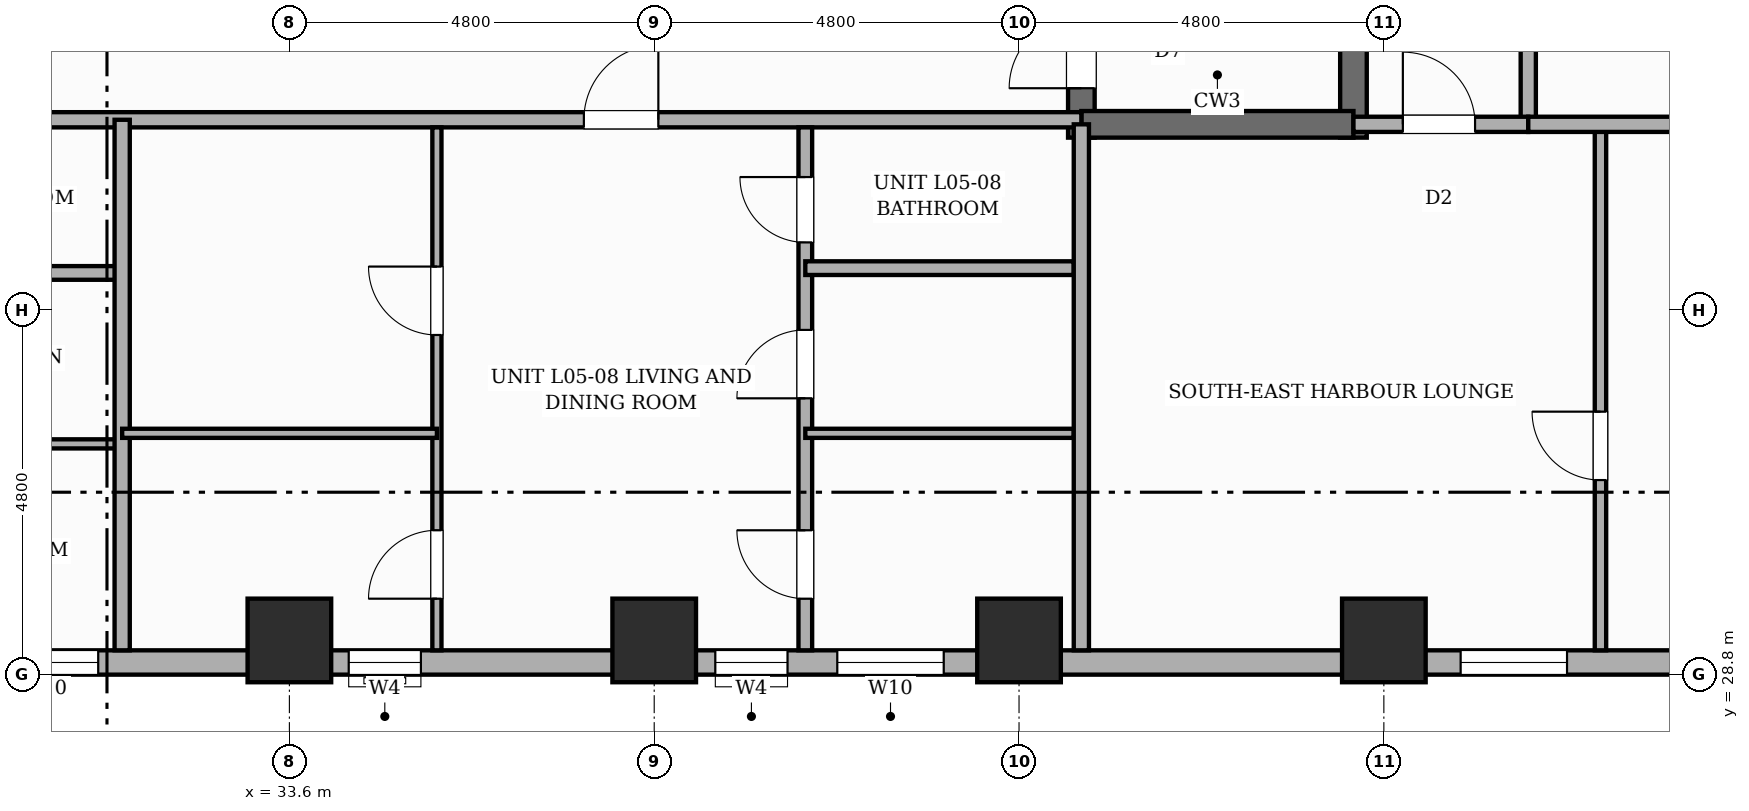
"""IFC4 building model, lengths in metres.
Left out: names, types, materials, properties, quantities, classifications, styles, units other than length and angle.
Written with IfcOpenShell. Run it as: python <this file> out.ifc"""

import sys

from ifc_helpers import new_model, si_unit, direction, frame, frame_2d, origin, origin_2d, place, context, subcontext, project, spatial, rectangle, extrude, element, fill, save


model = new_model("IFC4")
c1 = context("Model", 3, precision=1e-05, world=origin(), true_north=direction((0.0, 1.0)))
c2 = subcontext(c1, "Body", "Model", "MODEL_VIEW")
j1 = project(units=[si_unit("LENGTHUNIT", "METRE"), si_unit("PLANEANGLEUNIT", "RADIAN")], contexts=[c1])
p1 = place(None, origin())
s1 = spatial("IfcSite", under=j1, at=p1, CompositionType="ELEMENT")
p2 = place(p1, origin())
s2 = spatial("IfcBuilding", under=s1, at=p2, CompositionType="ELEMENT")
p3 = place(p2, frame((0.0, 0.0, 25.0)))
s3 = spatial("IfcBuildingStorey", under=s2, at=p3, CompositionType="ELEMENT", Elevation=25.0)
p4 = place(p3, frame((44.02, 35.865, 0.0), z_axis=(0.0, 0.0, 1.0), x_axis=(0.0, 1.0, 0.0)))
e1 = element("IfcWall", 1, at=p4, inside=s3, PredefinedType="SHEAR", context=c2, shape_type="SweptSolid", body=[
    extrude(rectangle(XDim=8.97, YDim=0.35, at=frame_2d((4.485, 0.0))), origin(), (0.0, 0.0, 1.0), 3.6),
])
p5 = place(p4, frame((0.65, 0.0, 0.0)))
e2 = element("IfcOpeningElement", 2, at=p5, cuts=e1, PredefinedType="OPENING", context=c2, shape_type="SweptSolid", body=[
    extrude(rectangle(XDim=0.95, YDim=2.1, at=frame_2d((0.475, 1.05))), frame((0.0, 0.185, 0.0), z_axis=(0.0, -1.0, 0.0), x_axis=(1.0, 0.0, 0.0)), (0.0, 0.0, 1.0), 0.37),
])
p6 = place(p3, frame((47.6, 35.865, 0.0), z_axis=(0.0, 0.0, 1.0), x_axis=(0.0, 1.0, 0.0)))
e3 = element("IfcWall", 3, at=p6, inside=s3, PredefinedType="SHEAR", context=c2, shape_type="SweptSolid", body=[
    extrude(rectangle(XDim=8.97, YDim=0.35, at=frame_2d((4.485, 0.0))), origin(), (0.0, 0.0, 1.0), 3.6),
])
p7 = place(p3, frame((44.02, 36.04, 0.0), z_axis=(0.0, 0.0, 1.0), x_axis=(1.0, 0.0, 0.0)))
e4 = element("IfcWall", 4, at=p7, inside=s3, PredefinedType="SHEAR", context=c2, shape_type="SweptSolid", body=[
    extrude(rectangle(XDim=3.58, YDim=0.35, at=frame_2d((1.79, 0.0))), origin(), (0.0, 0.0, 1.0), 3.6),
])
for number, where, z_axis, x_axis in (
    (5, (33.6, 29.25, 0.0), (0.0, 0.0, 1.0), (1.0, 0.0, 0.0)),
    (6, (38.4, 29.25, 0.0), (0.0, 0.0, 1.0), (1.0, 0.0, 0.0)),
    (7, (43.2, 29.25, 0.0), (0.0, 0.0, 1.0), (1.0, 0.0, 0.0)),
    (8, (48.0, 29.25, 0.0), (0.0, 0.0, 1.0), (1.0, 0.0, 0.0)),
):
    element("IfcColumn", number, at=place(p3, frame(where, z_axis=z_axis, x_axis=x_axis)), inside=s3, PredefinedType="COLUMN", context=c2, shape_type="SweptSolid", body=[
        extrude(rectangle(XDim=1.1, YDim=1.1, at=origin_2d()), origin(), (0.0, 0.0, 1.0), 3.6),
    ])
p8 = place(p3, frame((55.2, 28.96, 0.0), z_axis=(0.0, 0.0, 1.0), x_axis=(-1.0, 0.0, 0.0)))
e9 = element("IfcWall", 9, at=p8, inside=s3, PredefinedType="STANDARD", context=c2, shape_type="SweptSolid", body=[
    extrude(rectangle(XDim=28.8, YDim=0.32, at=frame_2d((14.4, 0.0))), origin(), (0.0, 0.0, 1.0), 2.53),
])
p9 = place(p8, frame((24.115, 0.0, 0.65)))
e10 = element("IfcOpeningElement", 10, at=p9, cuts=e9, PredefinedType="OPENING", context=c2, shape_type="SweptSolid", body=[
    extrude(rectangle(XDim=1.4, YDim=1.1, at=frame_2d((0.7, 0.55))), frame((0.0, 0.17, 0.0), z_axis=(0.0, -1.0, 0.0), x_axis=(1.0, 0.0, 0.0)), (0.0, 0.0, 1.0), 0.34),
])
p10 = place(p8, frame((12.991, 0.0, 0.65)))
e11 = element("IfcOpeningElement", 11, at=p10, cuts=e9, PredefinedType="OPENING", context=c2, shape_type="SweptSolid", body=[
    extrude(rectangle(XDim=1.4, YDim=1.1, at=frame_2d((0.7, 0.55))), frame((0.0, 0.17, 0.0), z_axis=(0.0, -1.0, 0.0), x_axis=(1.0, 0.0, 0.0)), (0.0, 0.0, 1.0), 0.34),
])
p11 = place(p8, frame((19.869, 0.0, 0.45)))
e12 = element("IfcOpeningElement", 12, at=p11, cuts=e9, PredefinedType="OPENING", context=c2, shape_type="SweptSolid", body=[
    extrude(rectangle(XDim=0.95, YDim=1.8, at=frame_2d((0.475, 0.9))), frame((0.0, 0.17, 0.0), z_axis=(0.0, -1.0, 0.0), x_axis=(1.0, 0.0, 0.0)), (0.0, 0.0, 1.0), 0.34),
])
p12 = place(p8, frame((4.79, 0.0, 0.65)))
e13 = element("IfcOpeningElement", 13, at=p12, cuts=e9, PredefinedType="OPENING", context=c2, shape_type="SweptSolid", body=[
    extrude(rectangle(XDim=1.4, YDim=1.1, at=frame_2d((0.7, 0.55))), frame((0.0, 0.17, 0.0), z_axis=(0.0, -1.0, 0.0), x_axis=(1.0, 0.0, 0.0)), (0.0, 0.0, 1.0), 0.34),
])
p13 = place(p8, frame((0.47, 0.0, 0.65)))
e14 = element("IfcOpeningElement", 14, at=p13, cuts=e9, PredefinedType="OPENING", context=c2, shape_type="SweptSolid", body=[
    extrude(rectangle(XDim=1.4, YDim=1.1, at=frame_2d((0.7, 0.55))), frame((0.0, 0.17, 0.0), z_axis=(0.0, -1.0, 0.0), x_axis=(1.0, 0.0, 0.0)), (0.0, 0.0, 1.0), 0.34),
])
p14 = place(p8, frame((15.046, 0.0, 0.45)))
e15 = element("IfcOpeningElement", 15, at=p14, cuts=e9, PredefinedType="OPENING", context=c2, shape_type="SweptSolid", body=[
    extrude(rectangle(XDim=0.95, YDim=1.8, at=frame_2d((0.475, 0.9))), frame((0.0, 0.17, 0.0), z_axis=(0.0, -1.0, 0.0), x_axis=(1.0, 0.0, 0.0)), (0.0, 0.0, 1.0), 0.34),
])
p15 = place(p3, frame((22.75, 36.1, 0.0), z_axis=(0.0, 0.0, 1.0), x_axis=(1.0, 0.0, 0.0)))
e16 = element("IfcWall", 16, at=p15, inside=s3, PredefinedType="PARTITIONING", context=c2, shape_type="SweptSolid", body=[
    extrude(rectangle(XDim=21.27, YDim=0.2, at=frame_2d((10.635, 0.0))), origin(), (0.0, 0.0, 1.0), 3.35),
])
p16 = place(p15, frame((1.628, 0.0, 0.0)))
e17 = element("IfcOpeningElement", 17, at=p16, cuts=e16, PredefinedType="OPENING", context=c2, shape_type="SweptSolid", body=[
    extrude(rectangle(XDim=0.98, YDim=2.18, at=frame_2d((0.49, 1.09))), frame((0.0, 0.11, 0.0), z_axis=(0.0, -1.0, 0.0), x_axis=(1.0, 0.0, 0.0)), (0.0, 0.0, 1.0), 0.22),
])
p17 = place(p15, frame((14.725, 0.0, 0.0)))
e18 = element("IfcOpeningElement", 18, at=p17, cuts=e16, PredefinedType="OPENING", context=c2, shape_type="SweptSolid", body=[
    extrude(rectangle(XDim=0.98, YDim=2.18, at=frame_2d((0.49, 1.09))), frame((0.0, 0.11, 0.0), z_axis=(0.0, -1.0, 0.0), x_axis=(1.0, 0.0, 0.0)), (0.0, 0.0, 1.0), 0.22),
])
p18 = place(p3, frame((26.807, 31.836, 0.0), z_axis=(0.0, 0.0, 1.0), x_axis=(1.0, 0.0, 0.0)))
e19 = element("IfcWall", 19, at=p18, inside=s3, PredefinedType="PARTITIONING", context=c2, shape_type="SweptSolid", body=[
    extrude(rectangle(XDim=4.593, YDim=0.12, at=frame_2d((2.296, 0.0))), origin(), (0.0, 0.0, 1.0), 3.35),
])
p19 = place(p3, frame((26.807, 34.085, 0.0), z_axis=(0.0, 0.0, 1.0), x_axis=(1.0, 0.0, 0.0)))
e20 = element("IfcWall", 20, at=p19, inside=s3, PredefinedType="PLUMBINGWALL", context=c2, shape_type="SweptSolid", body=[
    extrude(rectangle(XDim=4.593, YDim=0.18, at=frame_2d((2.296, 0.0))), origin(), (0.0, 0.0, 1.0), 3.35),
])
p20 = place(p3, frame((31.4, 29.12, 0.0), z_axis=(0.0, 0.0, 1.0), x_axis=(0.0, 1.0, 0.0)))
e21 = element("IfcWall", 21, at=p20, inside=s3, PredefinedType="SOLIDWALL", context=c2, shape_type="SweptSolid", body=[
    extrude(rectangle(XDim=6.98, YDim=0.2, at=frame_2d((3.49, 0.0))), origin(), (0.0, 0.0, 1.0), 3.35),
])
p21 = place(p3, frame((40.388, 29.12, 0.0), z_axis=(0.0, 0.0, 1.0), x_axis=(0.0, 1.0, 0.0)))
e22 = element("IfcWall", 22, at=p21, inside=s3, PredefinedType="PLUMBINGWALL", context=c2, shape_type="SweptSolid", body=[
    extrude(rectangle(XDim=6.88, YDim=0.18, at=frame_2d((3.44, 0.0))), origin(), (0.0, 0.0, 1.0), 3.35),
])
p22 = place(p21, frame((0.679, 0.0, 0.0)))
e23 = element("IfcOpeningElement", 23, at=p22, cuts=e22, PredefinedType="OPENING", context=c2, shape_type="SweptSolid", body=[
    extrude(rectangle(XDim=0.9, YDim=2.15, at=frame_2d((0.45, 1.075))), frame((0.0, 0.1, 0.0), z_axis=(0.0, -1.0, 0.0), x_axis=(1.0, 0.0, 0.0)), (0.0, 0.0, 1.0), 0.2),
])
p23 = place(p21, frame((3.315, 0.0, 0.0)))
e24 = element("IfcOpeningElement", 24, at=p23, cuts=e22, PredefinedType="OPENING", context=c2, shape_type="SweptSolid", body=[
    extrude(rectangle(XDim=0.9, YDim=2.15, at=frame_2d((0.45, 1.075))), frame((0.0, 0.1, 0.0), z_axis=(0.0, -1.0, 0.0), x_axis=(1.0, 0.0, 0.0)), (0.0, 0.0, 1.0), 0.2),
])
p24 = place(p21, frame((5.366, 0.0, 0.0)))
e25 = element("IfcOpeningElement", 25, at=p24, cuts=e22, PredefinedType="OPENING", context=c2, shape_type="SweptSolid", body=[
    extrude(rectangle(XDim=0.86, YDim=2.1, at=frame_2d((0.43, 1.05))), frame((0.0, 0.1, 0.0), z_axis=(0.0, -1.0, 0.0), x_axis=(1.0, 0.0, 0.0)), (0.0, 0.0, 1.0), 0.2),
])
p25 = place(p3, frame((35.541, 29.12, 0.0), z_axis=(0.0, 0.0, 1.0), x_axis=(0.0, 1.0, 0.0)))
e26 = element("IfcWall", 26, at=p25, inside=s3, PredefinedType="PARTITIONING", context=c2, shape_type="SweptSolid", body=[
    extrude(rectangle(XDim=6.88, YDim=0.12, at=frame_2d((3.44, 0.0))), origin(), (0.0, 0.0, 1.0), 3.35),
])
p26 = place(p25, frame((0.679, 0.0, 0.0)))
e27 = element("IfcOpeningElement", 27, at=p26, cuts=e26, PredefinedType="OPENING", context=c2, shape_type="SweptSolid", body=[
    extrude(rectangle(XDim=0.9, YDim=2.15, at=frame_2d((0.45, 1.075))), frame((0.0, 0.07, 0.0), z_axis=(0.0, -1.0, 0.0), x_axis=(1.0, 0.0, 0.0)), (0.0, 0.0, 1.0), 0.14),
])
p27 = place(p25, frame((4.149, 0.0, 0.0)))
e28 = element("IfcOpeningElement", 28, at=p27, cuts=e26, PredefinedType="OPENING", context=c2, shape_type="SweptSolid", body=[
    extrude(rectangle(XDim=0.9, YDim=2.15, at=frame_2d((0.45, 1.075))), frame((0.0, 0.07, 0.0), z_axis=(0.0, -1.0, 0.0), x_axis=(1.0, 0.0, 0.0)), (0.0, 0.0, 1.0), 0.14),
])
p28 = place(p3, frame((31.4, 31.975, 0.0), z_axis=(0.0, 0.0, 1.0), x_axis=(1.0, 0.0, 0.0)))
e29 = element("IfcWall", 29, at=p28, inside=s3, PredefinedType="PARTITIONING", context=c2, shape_type="SweptSolid", body=[
    extrude(rectangle(XDim=4.141, YDim=0.12, at=frame_2d((2.071, 0.0))), origin(), (0.0, 0.0, 1.0), 3.35),
])
p29 = place(p3, frame((40.388, 31.975, 0.0), z_axis=(0.0, 0.0, 1.0), x_axis=(1.0, 0.0, 0.0)))
e30 = element("IfcWall", 30, at=p29, inside=s3, PredefinedType="PARTITIONING", context=c2, shape_type="SweptSolid", body=[
    extrude(rectangle(XDim=3.532, YDim=0.12, at=frame_2d((1.766, 0.0))), origin(), (0.0, 0.0, 1.0), 3.35),
])
p30 = place(p3, frame((40.388, 34.148, 0.0), z_axis=(0.0, 0.0, 1.0), x_axis=(1.0, 0.0, 0.0)))
e31 = element("IfcWall", 31, at=p30, inside=s3, PredefinedType="PLUMBINGWALL", context=c2, shape_type="SweptSolid", body=[
    extrude(rectangle(XDim=3.532, YDim=0.18, at=frame_2d((1.766, 0.0))), origin(), (0.0, 0.0, 1.0), 3.35),
])
p31 = place(p3, frame((49.9, 36.04, 0.0), z_axis=(0.0, 0.0, 1.0), x_axis=(0.0, 1.0, 0.0)))
e32 = element("IfcWall", 32, at=p31, inside=s3, PredefinedType="PARTITIONING", context=c2, shape_type="SweptSolid", body=[
    extrude(rectangle(XDim=11.64, YDim=0.2, at=frame_2d((5.82, 0.0))), origin(), (0.0, 0.0, 1.0), 3.35),
])
p32 = place(p31, frame((6.251, 0.0, 0.0)))
e33 = element("IfcOpeningElement", 33, at=p32, cuts=e32, PredefinedType="OPENING", context=c2, shape_type="SweptSolid", body=[
    extrude(rectangle(XDim=0.98, YDim=2.18, at=frame_2d((0.49, 1.09))), frame((0.0, 0.11, 0.0), z_axis=(0.0, -1.0, 0.0), x_axis=(1.0, 0.0, 0.0)), (0.0, 0.0, 1.0), 0.22),
])
p33 = place(p3, frame((47.6, 36.04, 0.0), z_axis=(0.0, 0.0, 1.0), x_axis=(1.0, 0.0, 0.0)))
e34 = element("IfcWall", 34, at=p33, inside=s3, PredefinedType="PARTITIONING", context=c2, shape_type="SweptSolid", body=[
    extrude(rectangle(XDim=2.3, YDim=0.2, at=frame_2d((1.15, 0.0))), origin(), (0.0, 0.0, 1.0), 3.35),
])
p34 = place(p33, frame((0.65, 0.0, 0.0)))
e35 = element("IfcOpeningElement", 35, at=p34, cuts=e34, PredefinedType="OPENING", context=c2, shape_type="SweptSolid", body=[
    extrude(rectangle(XDim=0.95, YDim=2.15, at=frame_2d((0.475, 1.075))), frame((0.0, 0.11, 0.0), z_axis=(0.0, -1.0, 0.0), x_axis=(1.0, 0.0, 0.0)), (0.0, 0.0, 1.0), 0.22),
])
p35 = place(p3, frame((44.02, 29.12, 0.0), z_axis=(0.0, 0.0, 1.0), x_axis=(0.0, 1.0, 0.0)))
e36 = element("IfcWall", 36, at=p35, inside=s3, PredefinedType="SOLIDWALL", context=c2, shape_type="SweptSolid", body=[
    extrude(rectangle(XDim=6.92, YDim=0.2, at=frame_2d((3.46, 0.0))), origin(), (0.0, 0.0, 1.0), 3.35),
])
p36 = place(p3, frame((50.85, 29.12, 0.0), z_axis=(0.0, 0.0, 1.0), x_axis=(0.0, 1.0, 0.0)))
e37 = element("IfcWall", 37, at=p36, inside=s3, PredefinedType="PARTITIONING", context=c2, shape_type="SweptSolid", body=[
    extrude(rectangle(XDim=6.92, YDim=0.15, at=frame_2d((3.46, 0.0))), origin(), (0.0, 0.0, 1.0), 3.35),
])
p37 = place(p36, frame((2.24, 0.0, 0.0)))
e38 = element("IfcOpeningElement", 38, at=p37, cuts=e37, PredefinedType="OPENING", context=c2, shape_type="SweptSolid", body=[
    extrude(rectangle(XDim=0.9, YDim=2.15, at=frame_2d((0.45, 1.075))), frame((0.0, 0.085, 0.0), z_axis=(0.0, -1.0, 0.0), x_axis=(1.0, 0.0, 0.0)), (0.0, 0.0, 1.0), 0.17),
])
p38 = place(p3, frame((49.9, 36.04, 0.0), z_axis=(0.0, 0.0, 1.0), x_axis=(1.0, 0.0, 0.0)))
e39 = element("IfcWall", 39, at=p38, inside=s3, PredefinedType="SOLIDWALL", context=c2, shape_type="SweptSolid", body=[
    extrude(rectangle(XDim=7.38, YDim=0.2, at=frame_2d((3.69, 0.0))), origin(), (0.0, 0.0, 1.0), 3.35),
])
p39 = place(p9, origin())
e40 = element("IfcWindow", 40, at=p39, inside=s3, PartitioningType="SINGLE_PANEL", PredefinedType="WINDOW", context=c2, shape_type="SweptSolid", body=[
    extrude(rectangle(XDim=1.4, YDim=1.1, at=frame_2d((0.7, 0.55))), frame((0.0, 0.03, 0.0), z_axis=(0.0, -1.0, 0.0), x_axis=(1.0, 0.0, 0.0)), (0.0, 0.0, 1.0), 0.06),
])
fill(e10, e40)
p40 = place(p10, origin())
e41 = element("IfcWindow", 41, at=p40, inside=s3, PartitioningType="SINGLE_PANEL", PredefinedType="WINDOW", context=c2, shape_type="SweptSolid", body=[
    extrude(rectangle(XDim=1.4, YDim=1.1, at=frame_2d((0.7, 0.55))), frame((0.0, 0.03, 0.0), z_axis=(0.0, -1.0, 0.0), x_axis=(1.0, 0.0, 0.0)), (0.0, 0.0, 1.0), 0.06),
])
fill(e11, e41)
p41 = place(p11, origin())
e42 = element("IfcWindow", 42, at=p41, inside=s3, PartitioningType="SINGLE_PANEL", PredefinedType="WINDOW", context=c2, shape_type="SweptSolid", body=[
    extrude(rectangle(XDim=0.95, YDim=1.8, at=frame_2d((0.475, 0.9))), frame((0.0, 0.03, 0.0), z_axis=(0.0, -1.0, 0.0), x_axis=(1.0, 0.0, 0.0)), (0.0, 0.0, 1.0), 0.06),
])
fill(e12, e42)
p42 = place(p12, origin())
e43 = element("IfcWindow", 43, at=p42, inside=s3, PartitioningType="SINGLE_PANEL", PredefinedType="WINDOW", context=c2, shape_type="SweptSolid", body=[
    extrude(rectangle(XDim=1.4, YDim=1.1, at=frame_2d((0.7, 0.55))), frame((0.0, 0.03, 0.0), z_axis=(0.0, -1.0, 0.0), x_axis=(1.0, 0.0, 0.0)), (0.0, 0.0, 1.0), 0.06),
])
fill(e13, e43)
p43 = place(p14, origin())
e44 = element("IfcWindow", 44, at=p43, inside=s3, PartitioningType="SINGLE_PANEL", PredefinedType="WINDOW", context=c2, shape_type="SweptSolid", body=[
    extrude(rectangle(XDim=0.95, YDim=1.8, at=frame_2d((0.475, 0.9))), frame((0.0, 0.03, 0.0), z_axis=(0.0, -1.0, 0.0), x_axis=(1.0, 0.0, 0.0)), (0.0, 0.0, 1.0), 0.06),
])
fill(e15, e44)
p44 = place(p5, origin())
e45 = element("IfcDoor", 45, at=p44, inside=s3, OperationType="SINGLE_SWING_LEFT", PredefinedType="DOOR", context=c2, shape_type="SweptSolid", body=[
    extrude(rectangle(XDim=0.95, YDim=2.1, at=frame_2d((0.475, 1.05))), frame((0.0, 0.025, 0.0), z_axis=(0.0, -1.0, 0.0), x_axis=(1.0, 0.0, 0.0)), (0.0, 0.0, 1.0), 0.05),
])
fill(e2, e45)
p45 = place(p17, origin())
e46 = element("IfcDoor", 46, at=p45, inside=s3, OperationType="SINGLE_SWING_RIGHT", PredefinedType="DOOR", context=c2, shape_type="SweptSolid", body=[
    extrude(rectangle(XDim=0.98, YDim=2.18, at=frame_2d((0.49, 1.09))), frame((0.0, 0.025, 0.0), z_axis=(0.0, -1.0, 0.0), x_axis=(1.0, 0.0, 0.0)), (0.0, 0.0, 1.0), 0.05),
])
fill(e18, e46)
p46 = place(p26, origin())
e47 = element("IfcDoor", 47, at=p46, inside=s3, OperationType="SINGLE_SWING_LEFT", PredefinedType="DOOR", context=c2, shape_type="SweptSolid", body=[
    extrude(rectangle(XDim=0.9, YDim=2.15, at=frame_2d((0.45, 1.075))), frame((0.0, 0.025, 0.0), z_axis=(0.0, -1.0, 0.0), x_axis=(1.0, 0.0, 0.0)), (0.0, 0.0, 1.0), 0.05),
])
fill(e27, e47)
p47 = place(p27, origin())
e48 = element("IfcDoor", 48, at=p47, inside=s3, OperationType="SINGLE_SWING_RIGHT", PredefinedType="DOOR", context=c2, shape_type="SweptSolid", body=[
    extrude(rectangle(XDim=0.9, YDim=2.15, at=frame_2d((0.45, 1.075))), frame((0.0, 0.025, 0.0), z_axis=(0.0, -1.0, 0.0), x_axis=(1.0, 0.0, 0.0)), (0.0, 0.0, 1.0), 0.05),
])
fill(e28, e48)
p48 = place(p22, origin())
e49 = element("IfcDoor", 49, at=p48, inside=s3, OperationType="SINGLE_SWING_RIGHT", PredefinedType="DOOR", context=c2, shape_type="SweptSolid", body=[
    extrude(rectangle(XDim=0.9, YDim=2.15, at=frame_2d((0.45, 1.075))), frame((0.0, 0.025, 0.0), z_axis=(0.0, -1.0, 0.0), x_axis=(1.0, 0.0, 0.0)), (0.0, 0.0, 1.0), 0.05),
])
fill(e23, e49)
p49 = place(p23, origin())
e50 = element("IfcDoor", 50, at=p49, inside=s3, OperationType="SINGLE_SWING_LEFT", PredefinedType="DOOR", context=c2, shape_type="SweptSolid", body=[
    extrude(rectangle(XDim=0.9, YDim=2.15, at=frame_2d((0.45, 1.075))), frame((0.0, 0.025, 0.0), z_axis=(0.0, -1.0, 0.0), x_axis=(1.0, 0.0, 0.0)), (0.0, 0.0, 1.0), 0.05),
])
fill(e24, e50)
p50 = place(p24, origin())
e51 = element("IfcDoor", 51, at=p50, inside=s3, OperationType="SINGLE_SWING_RIGHT", PredefinedType="DOOR", context=c2, shape_type="SweptSolid", body=[
    extrude(rectangle(XDim=0.86, YDim=2.1, at=frame_2d((0.43, 1.05))), frame((0.0, 0.025, 0.0), z_axis=(0.0, -1.0, 0.0), x_axis=(1.0, 0.0, 0.0)), (0.0, 0.0, 1.0), 0.05),
])
fill(e25, e51)
p51 = place(p34, origin())
e52 = element("IfcDoor", 52, at=p51, inside=s3, OperationType="SINGLE_SWING_LEFT", PredefinedType="DOOR", context=c2, shape_type="SweptSolid", body=[
    extrude(rectangle(XDim=0.95, YDim=2.15, at=frame_2d((0.475, 1.075))), frame((0.0, 0.025, 0.0), z_axis=(0.0, -1.0, 0.0), x_axis=(1.0, 0.0, 0.0)), (0.0, 0.0, 1.0), 0.05),
])
fill(e35, e52)
p52 = place(p37, origin())
e53 = element("IfcDoor", 53, at=p52, inside=s3, OperationType="SINGLE_SWING_RIGHT", PredefinedType="DOOR", context=c2, shape_type="SweptSolid", body=[
    extrude(rectangle(XDim=0.9, YDim=2.15, at=frame_2d((0.45, 1.075))), frame((0.0, 0.025, 0.0), z_axis=(0.0, -1.0, 0.0), x_axis=(1.0, 0.0, 0.0)), (0.0, 0.0, 1.0), 0.05),
])
fill(e38, e53)
save(model, sys.argv[1])
